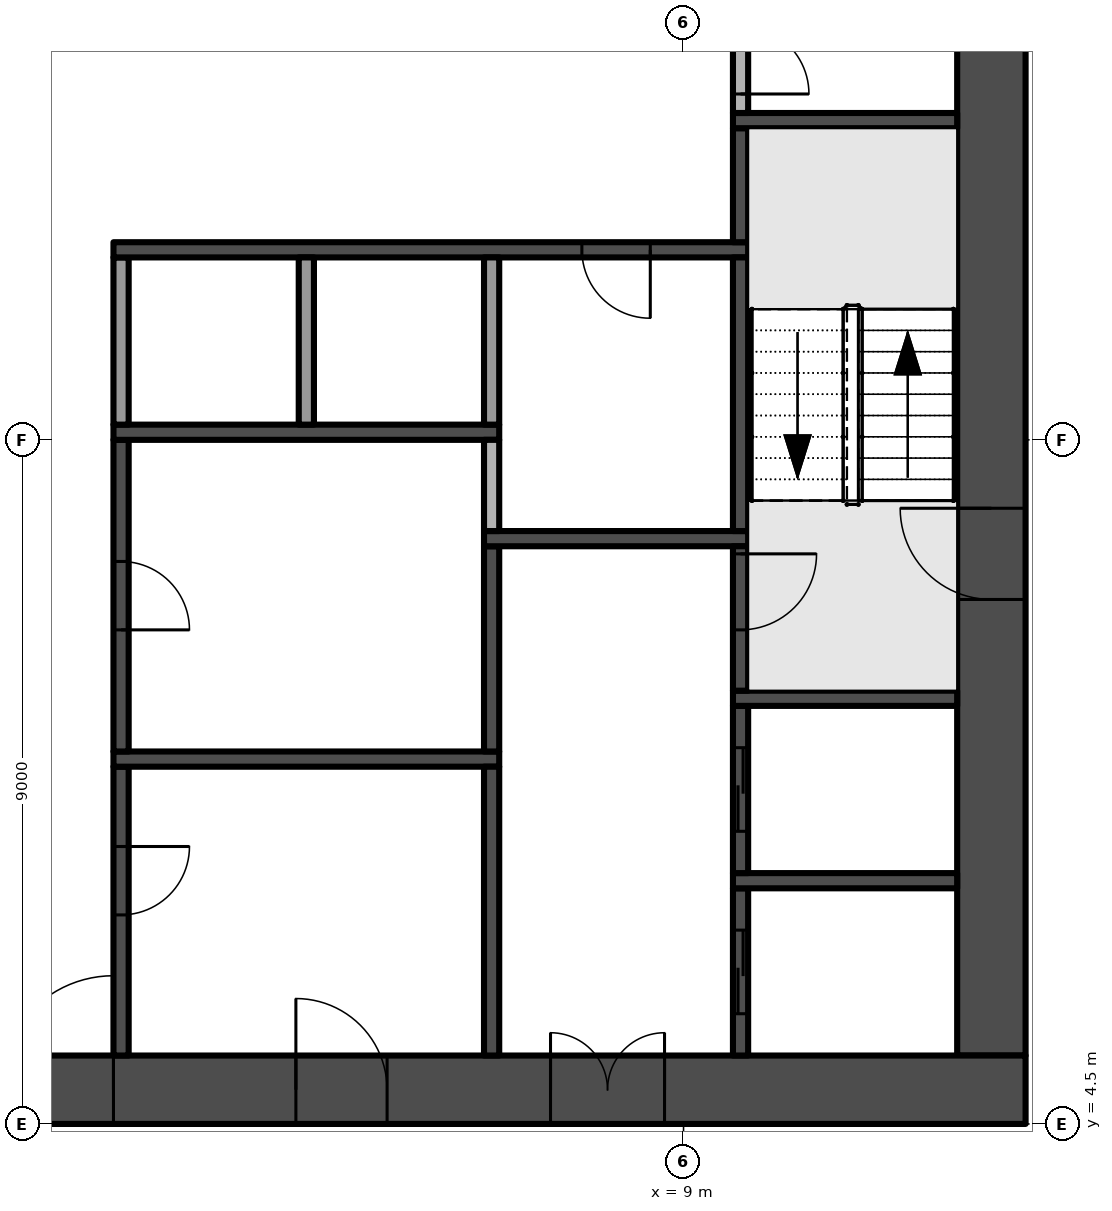
"""IFC4 building model, lengths in metres.
Left out: names, types, materials, properties, quantities, classifications, styles, units other than length and angle.
Written with IfcOpenShell. Run it as: python <this file> out.ifc"""

import sys

from ifc_helpers import new_model, si_unit, direction, frame, frame_2d, origin, place, context, subcontext, project, spatial, rectangle, extrude, element, fill, save


model = new_model("IFC4")
c1 = context("Model", 3, precision=1e-05, world=origin(), true_north=direction((0.0, 1.0)))
c2 = subcontext(c1, "Body", "Model", "MODEL_VIEW")
j1 = project(units=[si_unit("LENGTHUNIT", "METRE"), si_unit("PLANEANGLEUNIT", "RADIAN")], contexts=[c1])
p1 = place(None, origin())
s1 = spatial("IfcSite", under=j1, at=p1, CompositionType="ELEMENT")
p2 = place(p1, origin())
s2 = spatial("IfcBuilding", under=s1, at=p2, CompositionType="ELEMENT")
p3 = place(p2, frame((0.0, 0.0, 64.4)))
s3 = spatial("IfcBuildingStorey", under=s2, at=p3, CompositionType="ELEMENT", Elevation=64.4)
p4 = place(p3, frame((-13.5, 4.95, -0.3), z_axis=(0.0, 0.0, 1.0), x_axis=(1.0, 0.0, 0.0)))
e1 = element("IfcWall", 1, at=p4, inside=s3, PredefinedType="SHEAR", context=c2, shape_type="SweptSolid", body=[
    extrude(rectangle(XDim=27.0, YDim=0.9, at=frame_2d((13.5, 0.0))), origin(), (0.0, 0.0, 1.0), 5.0),
])
p5 = place(p4, frame((12.0, 0.0, 0.3)))
e2 = element("IfcOpeningElement", 2, at=p5, cuts=e1, PredefinedType="OPENING", context=c2, shape_type="SweptSolid", body=[
    extrude(rectangle(XDim=3.0, YDim=2.4, at=frame_2d((1.5, 1.2))), frame((0.0, 0.46, 0.0), z_axis=(0.0, -1.0, 0.0), x_axis=(1.0, 0.0, 0.0)), (0.0, 0.0, 1.0), 0.92),
])
p6 = place(p4, frame((4.9, 0.0, 0.3)))
e3 = element("IfcOpeningElement", 3, at=p6, cuts=e1, PredefinedType="OPENING", context=c2, shape_type="SweptSolid", body=[
    extrude(rectangle(XDim=1.2, YDim=2.2, at=frame_2d((0.6, 1.1))), frame((0.0, 0.46, 0.0), z_axis=(0.0, -1.0, 0.0), x_axis=(1.0, 0.0, 0.0)), (0.0, 0.0, 1.0), 0.92),
])
p7 = place(p4, frame((20.75, 0.0, 0.3)))
e4 = element("IfcOpeningElement", 4, at=p7, cuts=e1, PredefinedType="OPENING", context=c2, shape_type="SweptSolid", body=[
    extrude(rectangle(XDim=1.5, YDim=2.2, at=frame_2d((0.75, 1.1))), frame((0.0, 0.46, 0.0), z_axis=(0.0, -1.0, 0.0), x_axis=(1.0, 0.0, 0.0)), (0.0, 0.0, 1.0), 0.92),
])
p8 = place(p4, frame((17.4, 0.0, 0.3)))
e5 = element("IfcOpeningElement", 5, at=p8, cuts=e1, PredefinedType="OPENING", context=c2, shape_type="SweptSolid", body=[
    extrude(rectangle(XDim=1.2, YDim=2.2, at=frame_2d((0.6, 1.1))), frame((0.0, 0.46, 0.0), z_axis=(0.0, -1.0, 0.0), x_axis=(1.0, 0.0, 0.0)), (0.0, 0.0, 1.0), 0.92),
])
p9 = place(p3, frame((13.05, 5.4, -0.3), z_axis=(0.0, 0.0, 1.0), x_axis=(0.0, 1.0, 0.0)))
e6 = element("IfcWall", 6, at=p9, inside=s3, PredefinedType="SHEAR", context=c2, shape_type="SweptSolid", body=[
    extrude(rectangle(XDim=16.2, YDim=0.9, at=frame_2d((8.1, 0.0))), origin(), (0.0, 0.0, 1.0), 5.0),
])
p10 = place(p9, frame((6.0, 0.0, 0.3)))
e7 = element("IfcOpeningElement", 7, at=p10, cuts=e6, PredefinedType="OPENING", context=c2, shape_type="SweptSolid", body=[
    extrude(rectangle(XDim=1.2, YDim=2.2, at=frame_2d((0.6, 1.1))), frame((0.0, 0.46, 0.0), z_axis=(0.0, -1.0, 0.0), x_axis=(1.0, 0.0, 0.0)), (0.0, 0.0, 1.0), 0.92),
])
p11 = place(p3, frame((1.6, 9.2, 0.0), z_axis=(0.0, 0.0, 1.0), x_axis=(0.0, -1.0, 0.0)))
e8 = element("IfcWall", 8, at=p11, inside=s3, PredefinedType="SHEAR", context=c2, shape_type="SweptSolid", body=[
    extrude(rectangle(XDim=3.8, YDim=0.2, at=frame_2d((1.9, 0.0))), origin(), (0.0, 0.0, 1.0), 4.7),
])
p12 = place(p11, frame((1.05, 0.0, 0.0)))
e9 = element("IfcOpeningElement", 9, at=p12, cuts=e8, PredefinedType="OPENING", context=c2, shape_type="SweptSolid", body=[
    extrude(rectangle(XDim=0.9, YDim=2.1, at=frame_2d((0.45, 1.05))), frame((0.0, 0.11, 0.0), z_axis=(0.0, -1.0, 0.0), x_axis=(1.0, 0.0, 0.0)), (0.0, 0.0, 1.0), 0.22),
])
p13 = place(p3, frame((1.5, 9.3, 0.0), z_axis=(0.0, 0.0, 1.0), x_axis=(1.0, 0.0, 0.0)))
e10 = element("IfcWall", 10, at=p13, inside=s3, PredefinedType="SHEAR", context=c2, shape_type="SweptSolid", body=[
    extrude(rectangle(XDim=5.075, YDim=0.2, at=frame_2d((2.538, 0.0))), origin(), (0.0, 0.0, 1.0), 4.7),
])
p14 = place(p3, frame((1.6, 13.5, 0.0), z_axis=(0.0, 0.0, 1.0), x_axis=(0.0, -1.0, 0.0)))
e11 = element("IfcWall", 11, at=p14, inside=s3, PredefinedType="SHEAR", context=c2, shape_type="SweptSolid", body=[
    extrude(rectangle(XDim=4.1, YDim=0.2, at=frame_2d((2.05, 0.0))), origin(), (0.0, 0.0, 1.0), 4.7),
])
p15 = place(p14, frame((1.6, 0.0, 0.0)))
e12 = element("IfcOpeningElement", 12, at=p15, cuts=e11, PredefinedType="OPENING", context=c2, shape_type="SweptSolid", body=[
    extrude(rectangle(XDim=0.9, YDim=2.1, at=frame_2d((0.45, 1.05))), frame((0.0, 0.11, 0.0), z_axis=(0.0, -1.0, 0.0), x_axis=(1.0, 0.0, 0.0)), (0.0, 0.0, 1.0), 0.22),
])
p16 = place(p3, frame((1.5, 13.6, 0.0), z_axis=(0.0, 0.0, 1.0), x_axis=(1.0, 0.0, 0.0)))
e13 = element("IfcWall", 13, at=p16, inside=s3, PredefinedType="SHEAR", context=c2, shape_type="SweptSolid", body=[
    extrude(rectangle(XDim=5.075, YDim=0.2, at=frame_2d((2.538, 0.0))), origin(), (0.0, 0.0, 1.0), 4.7),
])
p17 = place(p3, frame((1.6, 13.7, 0.0), z_axis=(0.0, 0.0, 1.0), x_axis=(0.0, 1.0, 0.0)))
e14 = element("IfcWall", 14, at=p17, inside=s3, PredefinedType="PARTITIONING", context=c2, shape_type="SweptSolid", body=[
    extrude(rectangle(XDim=2.2, YDim=0.2, at=frame_2d((1.1, 0.0))), origin(), (0.0, 0.0, 1.0), 4.7),
])
p18 = place(p3, frame((9.85, 16.0, 0.0), z_axis=(0.0, 0.0, 1.0), x_axis=(-1.0, 0.0, 0.0)))
e15 = element("IfcWall", 15, at=p18, inside=s3, PredefinedType="SHEAR", context=c2, shape_type="SweptSolid", body=[
    extrude(rectangle(XDim=8.35, YDim=0.2, at=frame_2d((4.175, 0.0))), origin(), (0.0, 0.0, 1.0), 4.7),
])
p19 = place(p18, frame((1.288, 0.0, 0.0)))
e16 = element("IfcOpeningElement", 16, at=p19, cuts=e15, PredefinedType="OPENING", context=c2, shape_type="SweptSolid", body=[
    extrude(rectangle(XDim=0.9, YDim=2.1, at=frame_2d((0.45, 1.05))), frame((0.0, 0.11, 0.0), z_axis=(0.0, -1.0, 0.0), x_axis=(1.0, 0.0, 0.0)), (0.0, 0.0, 1.0), 0.22),
])
p20 = place(p3, frame((4.037, 13.7, 0.0), z_axis=(0.0, 0.0, 1.0), x_axis=(0.0, 1.0, 0.0)))
e17 = element("IfcWall", 17, at=p20, inside=s3, PredefinedType="PARTITIONING", context=c2, shape_type="SweptSolid", body=[
    extrude(rectangle(XDim=2.2, YDim=0.2, at=frame_2d((1.1, 0.0))), origin(), (0.0, 0.0, 1.0), 4.7),
])
p21 = place(p3, frame((6.475, 5.4, 0.0), z_axis=(0.0, 0.0, 1.0), x_axis=(0.0, 1.0, 0.0)))
e18 = element("IfcWall", 18, at=p21, inside=s3, PredefinedType="SHEAR", context=c2, shape_type="SweptSolid", body=[
    extrude(rectangle(XDim=3.8, YDim=0.2, at=frame_2d((1.9, 0.0))), origin(), (0.0, 0.0, 1.0), 4.7),
])
p22 = place(p3, frame((6.475, 9.4, 0.0), z_axis=(0.0, 0.0, 1.0), x_axis=(0.0, 1.0, 0.0)))
e19 = element("IfcWall", 19, at=p22, inside=s3, PredefinedType="SHEAR", context=c2, shape_type="SweptSolid", body=[
    extrude(rectangle(XDim=2.7, YDim=0.2, at=frame_2d((1.35, 0.0))), origin(), (0.0, 0.0, 1.0), 4.7),
])
p23 = place(p3, frame((6.375, 12.2, 0.0), z_axis=(0.0, 0.0, 1.0), x_axis=(1.0, 0.0, 0.0)))
e20 = element("IfcWall", 20, at=p23, inside=s3, PredefinedType="SHEAR", context=c2, shape_type="SweptSolid", body=[
    extrude(rectangle(XDim=3.475, YDim=0.2, at=frame_2d((1.738, 0.0))), origin(), (0.0, 0.0, 1.0), 4.7),
])
p24 = place(p3, frame((6.475, 12.3, 0.0), z_axis=(0.0, 0.0, 1.0), x_axis=(0.0, 1.0, 0.0)))
e21 = element("IfcWall", 21, at=p24, inside=s3, PredefinedType="PARTITIONING", context=c2, shape_type="SweptSolid", body=[
    extrude(rectangle(XDim=1.2, YDim=0.2, at=frame_2d((0.6, 0.0))), origin(), (0.0, 0.0, 1.0), 4.7),
])
p25 = place(p3, frame((6.475, 13.7, 0.0), z_axis=(0.0, 0.0, 1.0), x_axis=(0.0, 1.0, 0.0)))
e22 = element("IfcWall", 22, at=p25, inside=s3, PredefinedType="PARTITIONING", context=c2, shape_type="SweptSolid", body=[
    extrude(rectangle(XDim=2.2, YDim=0.2, at=frame_2d((1.1, 0.0))), origin(), (0.0, 0.0, 1.0), 4.7),
])
p26 = place(p3, frame((9.75, 5.4, 0.0), z_axis=(0.0, 0.0, 1.0), x_axis=(0.0, 1.0, 0.0)))
e23 = element("IfcWall", 23, at=p26, inside=s3, PredefinedType="SHEAR", context=c2, shape_type="SweptSolid", body=[
    extrude(rectangle(XDim=2.2, YDim=0.2, at=frame_2d((1.1, 0.0))), origin(), (0.0, 0.0, 1.0), 4.7),
])
p27 = place(p26, frame((0.55, 0.0, 0.0)))
e24 = element("IfcOpeningElement", 24, at=p27, cuts=e23, PredefinedType="OPENING", context=c2, shape_type="SweptSolid", body=[
    extrude(rectangle(XDim=1.1, YDim=2.1, at=frame_2d((0.55, 1.05))), frame((0.0, 0.11, 0.0), z_axis=(0.0, -1.0, 0.0), x_axis=(1.0, 0.0, 0.0)), (0.0, 0.0, 1.0), 0.22),
])
p28 = place(p3, frame((9.65, 7.7, 0.0), z_axis=(0.0, 0.0, 1.0), x_axis=(1.0, 0.0, 0.0)))
e25 = element("IfcWall", 25, at=p28, inside=s3, PredefinedType="SHEAR", context=c2, shape_type="SweptSolid", body=[
    extrude(rectangle(XDim=2.95, YDim=0.2, at=frame_2d((1.475, 0.0))), origin(), (0.0, 0.0, 1.0), 4.7),
])
p29 = place(p3, frame((9.75, 7.8, 0.0), z_axis=(0.0, 0.0, 1.0), x_axis=(0.0, 1.0, 0.0)))
e26 = element("IfcWall", 26, at=p29, inside=s3, PredefinedType="SHEAR", context=c2, shape_type="SweptSolid", body=[
    extrude(rectangle(XDim=2.2, YDim=0.2, at=frame_2d((1.1, 0.0))), origin(), (0.0, 0.0, 1.0), 4.7),
])
p30 = place(p29, frame((0.55, 0.0, 0.0)))
e27 = element("IfcOpeningElement", 27, at=p30, cuts=e26, PredefinedType="OPENING", context=c2, shape_type="SweptSolid", body=[
    extrude(rectangle(XDim=1.1, YDim=2.1, at=frame_2d((0.55, 1.05))), frame((0.0, 0.11, 0.0), z_axis=(0.0, -1.0, 0.0), x_axis=(1.0, 0.0, 0.0)), (0.0, 0.0, 1.0), 0.22),
])
p31 = place(p3, frame((9.65, 10.1, 0.0), z_axis=(0.0, 0.0, 1.0), x_axis=(1.0, 0.0, 0.0)))
e28 = element("IfcWall", 28, at=p31, inside=s3, PredefinedType="SHEAR", context=c2, shape_type="SweptSolid", body=[
    extrude(rectangle(XDim=2.95, YDim=0.2, at=frame_2d((1.475, 0.0))), origin(), (0.0, 0.0, 1.0), 4.7),
])
p32 = place(p3, frame((9.75, 12.1, 0.0), z_axis=(0.0, 0.0, 1.0), x_axis=(0.0, -1.0, 0.0)))
e29 = element("IfcWall", 29, at=p32, inside=s3, PredefinedType="SHEAR", context=c2, shape_type="SweptSolid", body=[
    extrude(rectangle(XDim=1.9, YDim=0.2, at=frame_2d((0.95, 0.0))), origin(), (0.0, 0.0, 1.0), 4.7),
])
p33 = place(p32, frame((0.1, 0.0, 0.0)))
e30 = element("IfcOpeningElement", 30, at=p33, cuts=e29, PredefinedType="OPENING", context=c2, shape_type="SweptSolid", body=[
    extrude(rectangle(XDim=1.0, YDim=2.2, at=frame_2d((0.5, 1.1))), frame((0.0, 0.11, 0.0), z_axis=(0.0, -1.0, 0.0), x_axis=(1.0, 0.0, 0.0)), (0.0, 0.0, 1.0), 0.22),
])
p34 = place(p3, frame((9.75, 12.3, 0.0), z_axis=(0.0, 0.0, 1.0), x_axis=(0.0, 1.0, 0.0)))
e31 = element("IfcWall", 31, at=p34, inside=s3, PredefinedType="SHEAR", context=c2, shape_type="SweptSolid", body=[
    extrude(rectangle(XDim=3.6, YDim=0.2, at=frame_2d((1.8, 0.0))), origin(), (0.0, 0.0, 1.0), 4.7),
])
p35 = place(p3, frame((9.75, 16.1, 0.0), z_axis=(0.0, 0.0, 1.0), x_axis=(0.0, 1.0, 0.0)))
e32 = element("IfcWall", 32, at=p35, inside=s3, PredefinedType="SHEAR", context=c2, shape_type="SweptSolid", body=[
    extrude(rectangle(XDim=1.5, YDim=0.2, at=frame_2d((0.75, 0.0))), origin(), (0.0, 0.0, 1.0), 4.7),
])
p36 = place(p3, frame((9.65, 17.7, 0.0), z_axis=(0.0, 0.0, 1.0), x_axis=(1.0, 0.0, 0.0)))
e33 = element("IfcWall", 33, at=p36, inside=s3, PredefinedType="SHEAR", context=c2, shape_type="SweptSolid", body=[
    extrude(rectangle(XDim=2.95, YDim=0.2, at=frame_2d((1.475, 0.0))), origin(), (0.0, 0.0, 1.0), 4.7),
])
p37 = place(p3, frame((9.75, 19.2, 0.0), z_axis=(0.0, 0.0, 1.0), x_axis=(0.0, -1.0, 0.0)))
e34 = element("IfcWall", 34, at=p37, inside=s3, PredefinedType="PARTITIONING", context=c2, shape_type="SweptSolid", body=[
    extrude(rectangle(XDim=1.4, YDim=0.2, at=frame_2d((0.7, 0.0))), origin(), (0.0, 0.0, 1.0), 4.7),
])
p38 = place(p37, frame((0.25, 0.0, 0.0)))
e35 = element("IfcOpeningElement", 35, at=p38, cuts=e34, PredefinedType="OPENING", context=c2, shape_type="SweptSolid", body=[
    extrude(rectangle(XDim=0.9, YDim=2.1, at=frame_2d((0.45, 1.05))), frame((0.0, 0.11, 0.0), z_axis=(0.0, -1.0, 0.0), x_axis=(1.0, 0.0, 0.0)), (0.0, 0.0, 1.0), 0.22),
])
p39 = place(p5, frame((3.0, 0.0, 0.0), z_axis=(0.0, 0.0, 1.0), x_axis=(-1.0, 0.0, 0.0)))
e36 = element("IfcDoor", 36, at=p39, inside=s3, OperationType="DOUBLE_DOOR_SINGLE_SWING", PredefinedType="DOOR", context=c2, shape_type="SweptSolid", body=[
    extrude(rectangle(XDim=3.0, YDim=2.4, at=frame_2d((1.5, 1.2))), frame((0.0, 0.025, 0.0), z_axis=(0.0, -1.0, 0.0), x_axis=(1.0, 0.0, 0.0)), (0.0, 0.0, 1.0), 0.05),
])
fill(e2, e36)
p40 = place(p10, frame((1.2, 0.0, 0.0), z_axis=(0.0, 0.0, 1.0), x_axis=(-1.0, 0.0, 0.0)))
e37 = element("IfcDoor", 37, at=p40, inside=s3, OperationType="SINGLE_SWING_LEFT", PredefinedType="DOOR", context=c2, shape_type="SweptSolid", body=[
    extrude(rectangle(XDim=1.2, YDim=2.2, at=frame_2d((0.6, 1.1))), frame((0.0, 0.025, 0.0), z_axis=(0.0, -1.0, 0.0), x_axis=(1.0, 0.0, 0.0)), (0.0, 0.0, 1.0), 0.05),
])
fill(e7, e37)
p41 = place(p7, frame((1.5, 0.0, 0.0), z_axis=(0.0, 0.0, 1.0), x_axis=(-1.0, 0.0, 0.0)))
e38 = element("IfcDoor", 38, at=p41, inside=s3, OperationType="DOUBLE_DOOR_SINGLE_SWING", PredefinedType="DOOR", context=c2, shape_type="SweptSolid", body=[
    extrude(rectangle(XDim=1.5, YDim=2.2, at=frame_2d((0.75, 1.1))), frame((0.0, 0.025, 0.0), z_axis=(0.0, -1.0, 0.0), x_axis=(1.0, 0.0, 0.0)), (0.0, 0.0, 1.0), 0.05),
])
fill(e4, e38)
p42 = place(p8, frame((1.2, 0.0, 0.0), z_axis=(0.0, 0.0, 1.0), x_axis=(-1.0, 0.0, 0.0)))
e39 = element("IfcDoor", 39, at=p42, inside=s3, OperationType="SINGLE_SWING_RIGHT", PredefinedType="DOOR", context=c2, shape_type="SweptSolid", body=[
    extrude(rectangle(XDim=1.2, YDim=2.2, at=frame_2d((0.6, 1.1))), frame((0.0, 0.025, 0.0), z_axis=(0.0, -1.0, 0.0), x_axis=(1.0, 0.0, 0.0)), (0.0, 0.0, 1.0), 0.05),
])
fill(e5, e39)
p43 = place(p33, origin())
e40 = element("IfcDoor", 40, at=p43, inside=s3, OperationType="SINGLE_SWING_LEFT", PredefinedType="DOOR", context=c2, shape_type="SweptSolid", body=[
    extrude(rectangle(XDim=1.0, YDim=2.2, at=frame_2d((0.5, 1.1))), frame((0.0, 0.025, 0.0), z_axis=(0.0, -1.0, 0.0), x_axis=(1.0, 0.0, 0.0)), (0.0, 0.0, 1.0), 0.05),
])
fill(e30, e40)
p44 = place(p27, origin())
e41 = element("IfcDoor", 41, at=p44, inside=s3, OperationType="SLIDING_TO_RIGHT", PredefinedType="DOOR", context=c2, shape_type="SweptSolid", body=[
    extrude(rectangle(XDim=1.1, YDim=2.1, at=frame_2d((0.55, 1.05))), frame((0.0, 0.025, 0.0), z_axis=(0.0, -1.0, 0.0), x_axis=(1.0, 0.0, 0.0)), (0.0, 0.0, 1.0), 0.05),
])
fill(e24, e41)
p45 = place(p30, origin())
e42 = element("IfcDoor", 42, at=p45, inside=s3, OperationType="SLIDING_TO_RIGHT", PredefinedType="DOOR", context=c2, shape_type="SweptSolid", body=[
    extrude(rectangle(XDim=1.1, YDim=2.1, at=frame_2d((0.55, 1.05))), frame((0.0, 0.025, 0.0), z_axis=(0.0, -1.0, 0.0), x_axis=(1.0, 0.0, 0.0)), (0.0, 0.0, 1.0), 0.05),
])
fill(e27, e42)
p46 = place(p12, origin())
e43 = element("IfcDoor", 43, at=p46, inside=s3, OperationType="SINGLE_SWING_LEFT", PredefinedType="DOOR", context=c2, shape_type="SweptSolid", body=[
    extrude(rectangle(XDim=0.9, YDim=2.1, at=frame_2d((0.45, 1.05))), frame((0.0, 0.025, 0.0), z_axis=(0.0, -1.0, 0.0), x_axis=(1.0, 0.0, 0.0)), (0.0, 0.0, 1.0), 0.05),
])
fill(e9, e43)
p47 = place(p15, origin())
e44 = element("IfcDoor", 44, at=p47, inside=s3, OperationType="SINGLE_SWING_RIGHT", PredefinedType="DOOR", context=c2, shape_type="SweptSolid", body=[
    extrude(rectangle(XDim=0.9, YDim=2.1, at=frame_2d((0.45, 1.05))), frame((0.0, 0.025, 0.0), z_axis=(0.0, -1.0, 0.0), x_axis=(1.0, 0.0, 0.0)), (0.0, 0.0, 1.0), 0.05),
])
fill(e12, e44)
p48 = place(p19, origin())
e45 = element("IfcDoor", 45, at=p48, inside=s3, OperationType="SINGLE_SWING_LEFT", PredefinedType="DOOR", context=c2, shape_type="SweptSolid", body=[
    extrude(rectangle(XDim=0.9, YDim=2.1, at=frame_2d((0.45, 1.05))), frame((0.0, 0.025, 0.0), z_axis=(0.0, -1.0, 0.0), x_axis=(1.0, 0.0, 0.0)), (0.0, 0.0, 1.0), 0.05),
])
fill(e16, e45)
p49 = place(p38, origin())
e46 = element("IfcDoor", 46, at=p49, inside=s3, OperationType="SINGLE_SWING_RIGHT", PredefinedType="DOOR", context=c2, shape_type="SweptSolid", body=[
    extrude(rectangle(XDim=0.9, YDim=2.1, at=frame_2d((0.45, 1.05))), frame((0.0, 0.025, 0.0), z_axis=(0.0, -1.0, 0.0), x_axis=(1.0, 0.0, 0.0)), (0.0, 0.0, 1.0), 0.05),
])
fill(e35, e46)
save(model, sys.argv[1])
